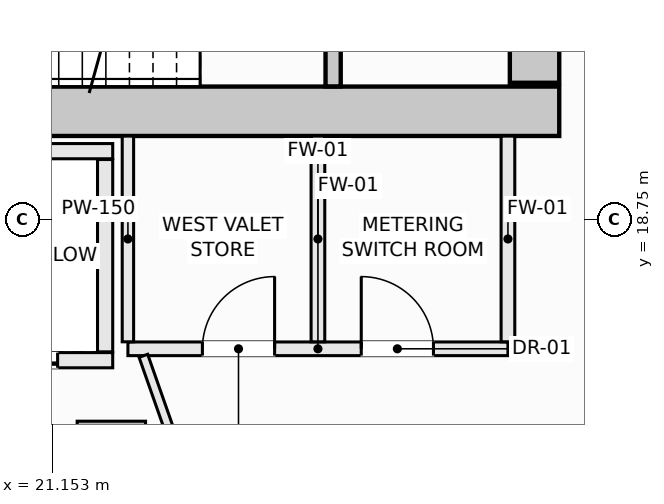
"""IFC4 building model, lengths in metres.
Left out: names, types, materials, properties, quantities, classifications, styles, units other than length and angle.
Written with IfcOpenShell. Run it as: python <this file> out.ifc"""

import sys

from ifc_helpers import new_model, si_unit, direction, frame, frame_2d, origin, origin_2d, place, context, subcontext, project, spatial, rectangle, extrude, element, fill, save


model = new_model("IFC4")
c1 = context("Model", 3, precision=1e-05, world=origin(), true_north=direction((0.0, 1.0)))
c2 = subcontext(c1, "Body", "Model", "MODEL_VIEW")
j1 = project(units=[si_unit("LENGTHUNIT", "METRE"), si_unit("PLANEANGLEUNIT", "RADIAN")], contexts=[c1])
p1 = place(None, origin())
s1 = spatial("IfcSite", under=j1, at=p1, CompositionType="ELEMENT")
p2 = place(p1, origin())
s2 = spatial("IfcBuilding", under=s1, at=p2, CompositionType="ELEMENT")
p3 = place(p2, frame((0.0, 0.0, 169.9)))
s3 = spatial("IfcBuildingStorey", under=s2, at=p3, CompositionType="ELEMENT", Elevation=169.9)
p4 = place(p3, frame((14.175, 20.175, -0.27), z_axis=(0.0, 0.0, 1.0), x_axis=(1.0, 0.0, 0.0)))
e1 = element("IfcWall", 1, at=p4, inside=s3, PredefinedType="SHEAR", context=c2, shape_type="SweptSolid", body=[
    extrude(rectangle(XDim=13.65, YDim=0.65, at=frame_2d((6.825, 0.0))), origin(), (0.0, 0.0, 1.0), 3.4),
])
p5 = place(p3, frame((27.5, 20.55, -0.27), z_axis=(0.0, 0.0, 1.0), x_axis=(0.0, 1.0, 0.0)))
e2 = element("IfcWall", 2, at=p5, inside=s3, PredefinedType="SHEAR", context=c2, shape_type="SweptSolid", body=[
    extrude(rectangle(XDim=1.5, YDim=0.65, at=frame_2d((0.75, 0.0))), origin(), (0.0, 0.0, 1.0), 3.4),
])
p6 = place(p3, frame((21.932, 15.648, -0.27), z_axis=(0.0, 0.0, 1.0), x_axis=(1.0, 0.0, 0.0)))
e3 = element("IfcColumn", 3, at=p6, inside=s3, PredefinedType="COLUMN", context=c2, shape_type="SweptSolid", body=[
    extrude(rectangle(XDim=0.9, YDim=0.9, at=origin_2d()), origin(), (0.0, 0.0, 1.0), 3.4),
])
p7 = place(p3, frame((24.85, 20.502, -0.27), z_axis=(0.0, 0.0, 1.0), x_axis=(0.0, 1.0, 0.0)))
e4 = element("IfcWall", 4, at=p7, inside=s3, PredefinedType="SHEAR", context=c2, shape_type="SweptSolid", body=[
    extrude(rectangle(XDim=3.038, YDim=0.2, at=frame_2d((1.519, 0.0))), origin(), (0.0, 0.0, 1.0), 3.4),
])
p8 = place(p7, frame((0.969, 0.0, 0.27)))
e5 = element("IfcOpeningElement", 5, at=p8, cuts=e4, PredefinedType="OPENING", context=c2, shape_type="SweptSolid", body=[
    extrude(rectangle(XDim=1.1, YDim=2.15, at=frame_2d((0.55, 1.075))), frame((0.0, 0.11, 0.0), z_axis=(0.0, -1.0, 0.0), x_axis=(1.0, 0.0, 0.0)), (0.0, 0.0, 1.0), 0.22),
])
p9 = place(p3, frame((19.4, 19.65, 0.0), z_axis=(0.0, 0.0, 1.0), x_axis=(1.0, 0.0, 0.0)))
e6 = element("IfcWall", 6, at=p9, inside=s3, PredefinedType="SOLIDWALL", context=c2, shape_type="SweptSolid", body=[
    extrude(rectangle(XDim=2.55, YDim=0.2, at=frame_2d((1.275, 0.0))), origin(), (0.0, 0.0, 1.0), 3.13),
])
p10 = place(p3, frame((19.4, 16.9, 0.0), z_axis=(0.0, 0.0, 1.0), x_axis=(1.0, 0.0, 0.0)))
e7 = element("IfcWall", 7, at=p10, inside=s3, PredefinedType="SOLIDWALL", context=c2, shape_type="SweptSolid", body=[
    extrude(rectangle(XDim=2.55, YDim=0.2, at=frame_2d((1.275, 0.0))), origin(), (0.0, 0.0, 1.0), 3.13),
])
p11 = place(p10, frame((0.725, 0.0, 0.0)))
e8 = element("IfcOpeningElement", 8, at=p11, cuts=e7, PredefinedType="OPENING", context=c2, shape_type="SweptSolid", body=[
    extrude(rectangle(XDim=1.1, YDim=2.2, at=frame_2d((0.55, 1.1))), frame((0.0, 0.11, 0.0), z_axis=(0.0, -1.0, 0.0), x_axis=(1.0, 0.0, 0.0)), (0.0, 0.0, 1.0), 0.22),
])
p12 = place(p3, frame((21.85, 17.01, 0.0), z_axis=(0.0, 0.0, 1.0), x_axis=(0.0, 1.0, 0.0)))
e9 = element("IfcWall", 9, at=p12, inside=s3, PredefinedType="SOLIDWALL", context=c2, shape_type="SweptSolid", body=[
    extrude(rectangle(XDim=2.53, YDim=0.2, at=frame_2d((1.265, 0.0))), origin(), (0.0, 0.0, 1.0), 3.13),
])
p13 = place(p3, frame((22.15, 17.05, 0.0), z_axis=(0.0, 0.0, 1.0), x_axis=(1.0, 0.0, 0.0)))
e10 = element("IfcWall", 10, at=p13, inside=s3, PredefinedType="SOLIDWALL", context=c2, shape_type="SweptSolid", body=[
    extrude(rectangle(XDim=5.0, YDim=0.18, at=frame_2d((2.5, 0.0))), origin(), (0.0, 0.0, 1.0), 3.13),
])
p14 = place(p13, frame((0.98, 0.0, 0.0)))
e11 = element("IfcOpeningElement", 11, at=p14, cuts=e10, PredefinedType="OPENING", context=c2, shape_type="SweptSolid", body=[
    extrude(rectangle(XDim=0.95, YDim=2.1, at=frame_2d((0.475, 1.05))), frame((0.0, 0.1, 0.0), z_axis=(0.0, -1.0, 0.0), x_axis=(1.0, 0.0, 0.0)), (0.0, 0.0, 1.0), 0.2),
])
p15 = place(p13, frame((3.07, 0.0, 0.0)))
e12 = element("IfcOpeningElement", 12, at=p15, cuts=e10, PredefinedType="OPENING", context=c2, shape_type="SweptSolid", body=[
    extrude(rectangle(XDim=0.95, YDim=2.1, at=frame_2d((0.475, 1.05))), frame((0.0, 0.1, 0.0), z_axis=(0.0, -1.0, 0.0), x_axis=(1.0, 0.0, 0.0)), (0.0, 0.0, 1.0), 0.2),
])
p16 = place(p3, frame((22.15, 17.142, 0.0), z_axis=(0.0, 0.0, 1.0), x_axis=(0.0, 1.0, 0.0)))
e13 = element("IfcWall", 13, at=p16, inside=s3, PredefinedType="PARTITIONING", context=c2, shape_type="SweptSolid", body=[
    extrude(rectangle(XDim=2.706, YDim=0.15, at=frame_2d((1.353, 0.0))), origin(), (0.0, 0.0, 1.0), 3.13),
])
for number, where, z_axis, x_axis in (
    (14, (24.65, 17.142, 0.0), (0.0, 0.0, 1.0), (0.0, 1.0, 0.0)),
    (15, (27.15, 17.142, 0.0), (0.0, 0.0, 1.0), (0.0, 1.0, 0.0)),
):
    element("IfcWall", number, at=place(p3, frame(where, z_axis=z_axis, x_axis=x_axis)), inside=s3, PredefinedType="SOLIDWALL", context=c2, shape_type="SweptSolid", body=[
        extrude(rectangle(XDim=2.706, YDim=0.18, at=frame_2d((1.353, 0.0))), origin(), (0.0, 0.0, 1.0), 3.13),
    ])
p17 = place(p3, frame((22.353, 16.958, 0.0), z_axis=(0.0, 0.0, 1.0), x_axis=(0.331370038458, -0.943500873138, 0.0)))
e16 = element("IfcWall", 16, at=p17, inside=s3, PredefinedType="PARTITIONING", context=c2, shape_type="SweptSolid", body=[
    extrude(rectangle(XDim=1.216, YDim=0.12, at=frame_2d((0.608, 0.0))), origin(), (0.0, 0.0, 1.0), 3.13),
])
p18 = place(p11, origin())
e17 = element("IfcDoor", 17, at=p18, inside=s3, OperationType="SLIDING_TO_LEFT", PredefinedType="DOOR", context=c2, shape_type="SweptSolid", body=[
    extrude(rectangle(XDim=1.1, YDim=2.2, at=frame_2d((0.55, 1.1))), frame((0.0, 0.025, 0.0), z_axis=(0.0, -1.0, 0.0), x_axis=(1.0, 0.0, 0.0)), (0.0, 0.0, 1.0), 0.05),
])
fill(e8, e17)
p19 = place(p14, origin())
e18 = element("IfcDoor", 18, at=p19, inside=s3, OperationType="SINGLE_SWING_RIGHT", PredefinedType="DOOR", context=c2, shape_type="SweptSolid", body=[
    extrude(rectangle(XDim=0.95, YDim=2.1, at=frame_2d((0.475, 1.05))), frame((0.0, 0.025, 0.0), z_axis=(0.0, -1.0, 0.0), x_axis=(1.0, 0.0, 0.0)), (0.0, 0.0, 1.0), 0.05),
])
fill(e11, e18)
p20 = place(p15, origin())
e19 = element("IfcDoor", 19, at=p20, inside=s3, OperationType="SINGLE_SWING_LEFT", PredefinedType="DOOR", context=c2, shape_type="SweptSolid", body=[
    extrude(rectangle(XDim=0.95, YDim=2.1, at=frame_2d((0.475, 1.05))), frame((0.0, 0.025, 0.0), z_axis=(0.0, -1.0, 0.0), x_axis=(1.0, 0.0, 0.0)), (0.0, 0.0, 1.0), 0.05),
])
fill(e12, e19)
save(model, sys.argv[1])
